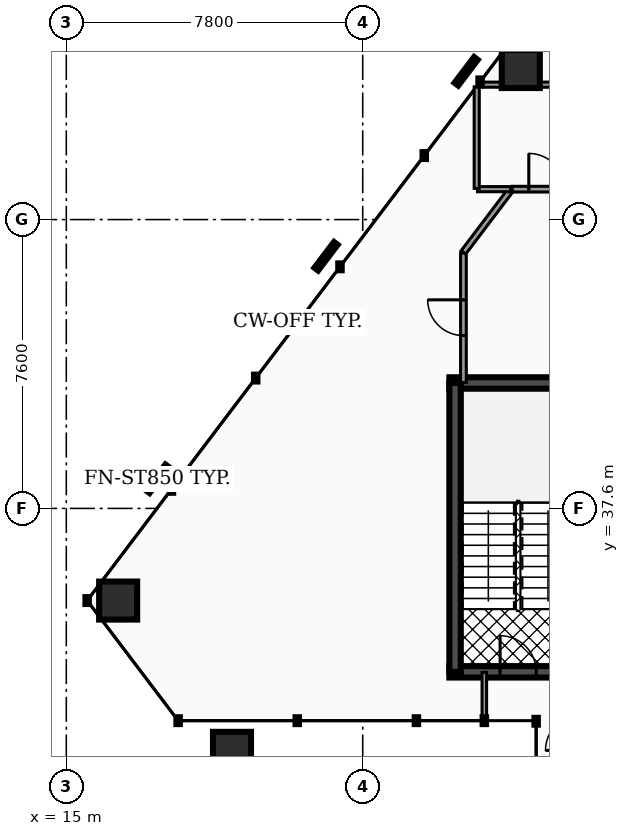
"""IFC4 building model, lengths in metres.
Left out: names, types, materials, properties, quantities, classifications, styles, units other than length and angle.
Written with IfcOpenShell. Run it as: python <this file> out.ifc"""

import sys

from ifc_helpers import new_model, si_unit, direction, frame, frame_2d, origin, origin_2d, place, context, subcontext, project, spatial, rectangle, hollow_rectangle, extrude, element, fill, save


model = new_model("IFC4")
c1 = context("Model", 3, precision=1e-05, world=origin(), true_north=direction((0.0, 1.0)))
c2 = subcontext(c1, "Body", "Model", "MODEL_VIEW")
j1 = project(units=[si_unit("LENGTHUNIT", "METRE"), si_unit("PLANEANGLEUNIT", "RADIAN")], contexts=[c1])
p1 = place(None, origin())
s1 = spatial("IfcSite", under=j1, at=p1, CompositionType="ELEMENT")
p2 = place(p1, origin())
s2 = spatial("IfcBuilding", under=s1, at=p2, CompositionType="ELEMENT")
p3 = place(p2, frame((0.0, 0.0, 68.34)))
s3 = spatial("IfcBuildingStorey", under=s2, at=p3, CompositionType="ELEMENT", Elevation=68.34)
p4 = place(p3, frame((25.08, 40.9, 0.0), z_axis=(0.0, 0.0, 1.0), x_axis=(1.0, 0.0, 0.0)))
e1 = element("IfcWall", 1, at=p4, inside=s3, PredefinedType="SHEAR", context=c2, shape_type="SweptSolid", body=[
    extrude(rectangle(XDim=3.52, YDim=0.3, at=frame_2d((1.76, 0.0))), origin(), (0.0, 0.0, 1.0), 3.82),
])
p5 = place(p3, frame((25.08, 33.3, 0.0), z_axis=(0.0, 0.0, 1.0), x_axis=(1.0, 0.0, 0.0)))
e2 = element("IfcWall", 2, at=p5, inside=s3, PredefinedType="SHEAR", context=c2, shape_type="SweptSolid", body=[
    extrude(rectangle(XDim=3.52, YDim=0.3, at=frame_2d((1.76, 0.0))), origin(), (0.0, 0.0, 1.0), 3.82),
])
p6 = place(p5, frame((1.335, 0.0, 0.0)))
e3 = element("IfcOpeningElement", 3, at=p6, cuts=e2, PredefinedType="OPENING", context=c2, shape_type="SweptSolid", body=[
    extrude(rectangle(XDim=0.95, YDim=2.2, at=frame_2d((0.475, 1.1))), frame((0.0, 0.16, 0.0), z_axis=(0.0, -1.0, 0.0), x_axis=(1.0, 0.0, 0.0)), (0.0, 0.0, 1.0), 0.32),
])
p7 = place(p3, frame((25.23, 33.3, 0.0), z_axis=(0.0, 0.0, 1.0), x_axis=(0.0, 1.0, 0.0)))
e4 = element("IfcWall", 4, at=p7, inside=s3, PredefinedType="SHEAR", context=c2, shape_type="SweptSolid", body=[
    extrude(rectangle(XDim=7.6, YDim=0.3, at=frame_2d((3.8, 0.0))), origin(), (0.0, 0.0, 1.0), 3.82),
])
p8 = place(p3, frame((26.96, 49.161, 0.0), z_axis=(-0.098563985299, -0.020285104071, 0.994923944508), x_axis=(0.201581600016, -0.979471724214, 0.0)))
e5 = element("IfcColumn", 5, at=p8, inside=s3, PredefinedType="COLUMN", context=c2, shape_type="SweptSolid", body=[
    extrude(hollow_rectangle(XDim=1.0, YDim=1.0, WallThickness=0.05, at=origin_2d()), origin(), (0.0, 0.0, 1.0), 3.839),
])
p9 = place(p3, frame((16.364, 35.175, 0.0), z_axis=(-0.021653582575, 0.08139199568, 0.996446920513), x_axis=(-0.966385381035, -0.2570978322, 0.0)))
e6 = element("IfcColumn", 6, at=p9, inside=s3, PredefinedType="COLUMN", context=c2, shape_type="SweptSolid", body=[
    extrude(hollow_rectangle(XDim=1.0, YDim=1.0, WallThickness=0.05, at=origin_2d()), origin(), (0.0, 0.0, 1.0), 3.833),
])
p10 = place(p3, frame((19.36, 31.22, 0.0), z_axis=(-0.001276376581, 0.054565098847, 0.99850939948), x_axis=(-0.99972652377, -0.023385415761, 0.0)))
e7 = element("IfcColumn", 7, at=p10, inside=s3, PredefinedType="COLUMN", context=c2, shape_type="SweptSolid", body=[
    extrude(hollow_rectangle(XDim=1.0, YDim=1.0, WallThickness=0.05, at=origin_2d()), origin(), (0.0, 0.0, 1.0), 3.825),
])
p11 = place(p3, frame((26.73, 46.0, 0.0), z_axis=(0.0, 0.0, 1.0), x_axis=(1.0, 0.0, 0.0)))
e8 = element("IfcWall", 8, at=p11, inside=s3, PredefinedType="PARTITIONING", context=c2, shape_type="SweptSolid", body=[
    extrude(rectangle(XDim=1.82, YDim=0.15, at=frame_2d((0.91, 0.0))), origin(), (0.0, 0.0, 1.0), 2.777),
])
p12 = place(p11, frame((0.44, 0.0, 0.0)))
e9 = element("IfcOpeningElement", 9, at=p12, cuts=e8, PredefinedType="OPENING", context=c2, shape_type="SweptSolid", body=[
    extrude(rectangle(XDim=0.94, YDim=2.05, at=frame_2d((0.47, 1.025))), frame((0.0, 0.085, 0.0), z_axis=(0.0, -1.0, 0.0), x_axis=(1.0, 0.0, 0.0)), (0.0, 0.0, 1.0), 0.17),
])
p13 = place(p3, frame((25.45, 40.915, 0.0), z_axis=(0.0, 0.0, 1.0), x_axis=(0.0, 1.0, 0.0)))
e10 = element("IfcWall", 10, at=p13, inside=s3, PredefinedType="PARTITIONING", context=c2, shape_type="SweptSolid", body=[
    extrude(rectangle(XDim=3.406, YDim=0.15, at=frame_2d((1.703, 0.0))), origin(), (0.0, 0.0, 1.0), 2.777),
])
p14 = place(p13, frame((1.233, 0.0, 0.0)))
e11 = element("IfcOpeningElement", 11, at=p14, cuts=e10, PredefinedType="OPENING", context=c2, shape_type="SweptSolid", body=[
    extrude(rectangle(XDim=0.94, YDim=2.05, at=frame_2d((0.47, 1.025))), frame((0.0, 0.085, 0.0), z_axis=(0.0, -1.0, 0.0), x_axis=(1.0, 0.0, 0.0)), (0.0, 0.0, 1.0), 0.17),
])
p15 = place(p3, frame((25.45, 44.337, 0.0), z_axis=(0.0, 0.0, 1.0), x_axis=(0.603848590911, 0.797099039803, 0.0)))
e12 = element("IfcWall", 12, at=p15, inside=s3, PredefinedType="PARTITIONING", context=c2, shape_type="SweptSolid", body=[
    extrude(rectangle(XDim=2.067, YDim=0.15, at=frame_2d((1.033, 0.0))), origin(), (0.0, 0.0, 1.0), 2.777),
])
p16 = place(p3, frame((25.82, 46.0, 0.0), z_axis=(0.0, 0.0, 1.0), x_axis=(1.0, 0.0, 0.0)))
e13 = element("IfcWall", 13, at=p16, inside=s3, PredefinedType="PARTITIONING", context=c2, shape_type="SweptSolid", body=[
    extrude(rectangle(XDim=0.87, YDim=0.135, at=frame_2d((0.435, 0.0))), origin(), (0.0, 0.0, 1.0), 2.777),
])
p17 = place(p3, frame((25.8, 46.02, 0.0), z_axis=(0.0, 0.0, 1.0), x_axis=(0.0, 1.0, 0.0)))
e14 = element("IfcWall", 14, at=p17, inside=s3, PredefinedType="PARTITIONING", context=c2, shape_type="SweptSolid", body=[
    extrude(rectangle(XDim=2.672, YDim=0.135, at=frame_2d((1.336, 0.0))), origin(), (0.0, 0.0, 1.0), 2.777),
])
p18 = place(p3, frame((25.848, 48.75, 0.0), z_axis=(0.0, 0.0, 1.0), x_axis=(1.0, 0.0, 0.0)))
e15 = element("IfcWall", 15, at=p18, inside=s3, PredefinedType="PARTITIONING", context=c2, shape_type="SweptSolid", body=[
    extrude(rectangle(XDim=4.132, YDim=0.135, at=frame_2d((2.066, 0.0))), origin(), (0.0, 0.0, 1.0), 2.777),
])
p19 = place(p3, frame((26.0, 32.03, 0.0), z_axis=(0.0, 0.0, 1.0), x_axis=(0.0, 1.0, 0.0)))
e16 = element("IfcWall", 16, at=p19, inside=s3, PredefinedType="PARTITIONING", context=c2, shape_type="SweptSolid", body=[
    extrude(rectangle(XDim=1.255, YDim=0.12, at=frame_2d((0.627, 0.0))), origin(), (0.0, 0.0, 1.0), 2.777),
])
p20 = place(p6, origin())
e17 = element("IfcDoor", 17, at=p20, inside=s3, OperationType="SINGLE_SWING_LEFT", PredefinedType="DOOR", context=c2, shape_type="SweptSolid", body=[
    extrude(rectangle(XDim=0.95, YDim=2.2, at=frame_2d((0.475, 1.1))), frame((0.0, 0.025, 0.0), z_axis=(0.0, -1.0, 0.0), x_axis=(1.0, 0.0, 0.0)), (0.0, 0.0, 1.0), 0.05),
])
fill(e3, e17)
p21 = place(p12, origin())
e18 = element("IfcDoor", 18, at=p21, inside=s3, OperationType="SINGLE_SWING_LEFT", PredefinedType="DOOR", context=c2, shape_type="SweptSolid", body=[
    extrude(rectangle(XDim=0.94, YDim=2.05, at=frame_2d((0.47, 1.025))), frame((0.0, 0.025, 0.0), z_axis=(0.0, -1.0, 0.0), x_axis=(1.0, 0.0, 0.0)), (0.0, 0.0, 1.0), 0.05),
])
fill(e9, e18)
p22 = place(p14, origin())
e19 = element("IfcDoor", 19, at=p22, inside=s3, OperationType="SINGLE_SWING_RIGHT", PredefinedType="DOOR", context=c2, shape_type="SweptSolid", body=[
    extrude(rectangle(XDim=0.94, YDim=2.05, at=frame_2d((0.47, 1.025))), frame((0.0, 0.025, 0.0), z_axis=(0.0, -1.0, 0.0), x_axis=(1.0, 0.0, 0.0)), (0.0, 0.0, 1.0), 0.05),
])
fill(e11, e19)
save(model, sys.argv[1])
